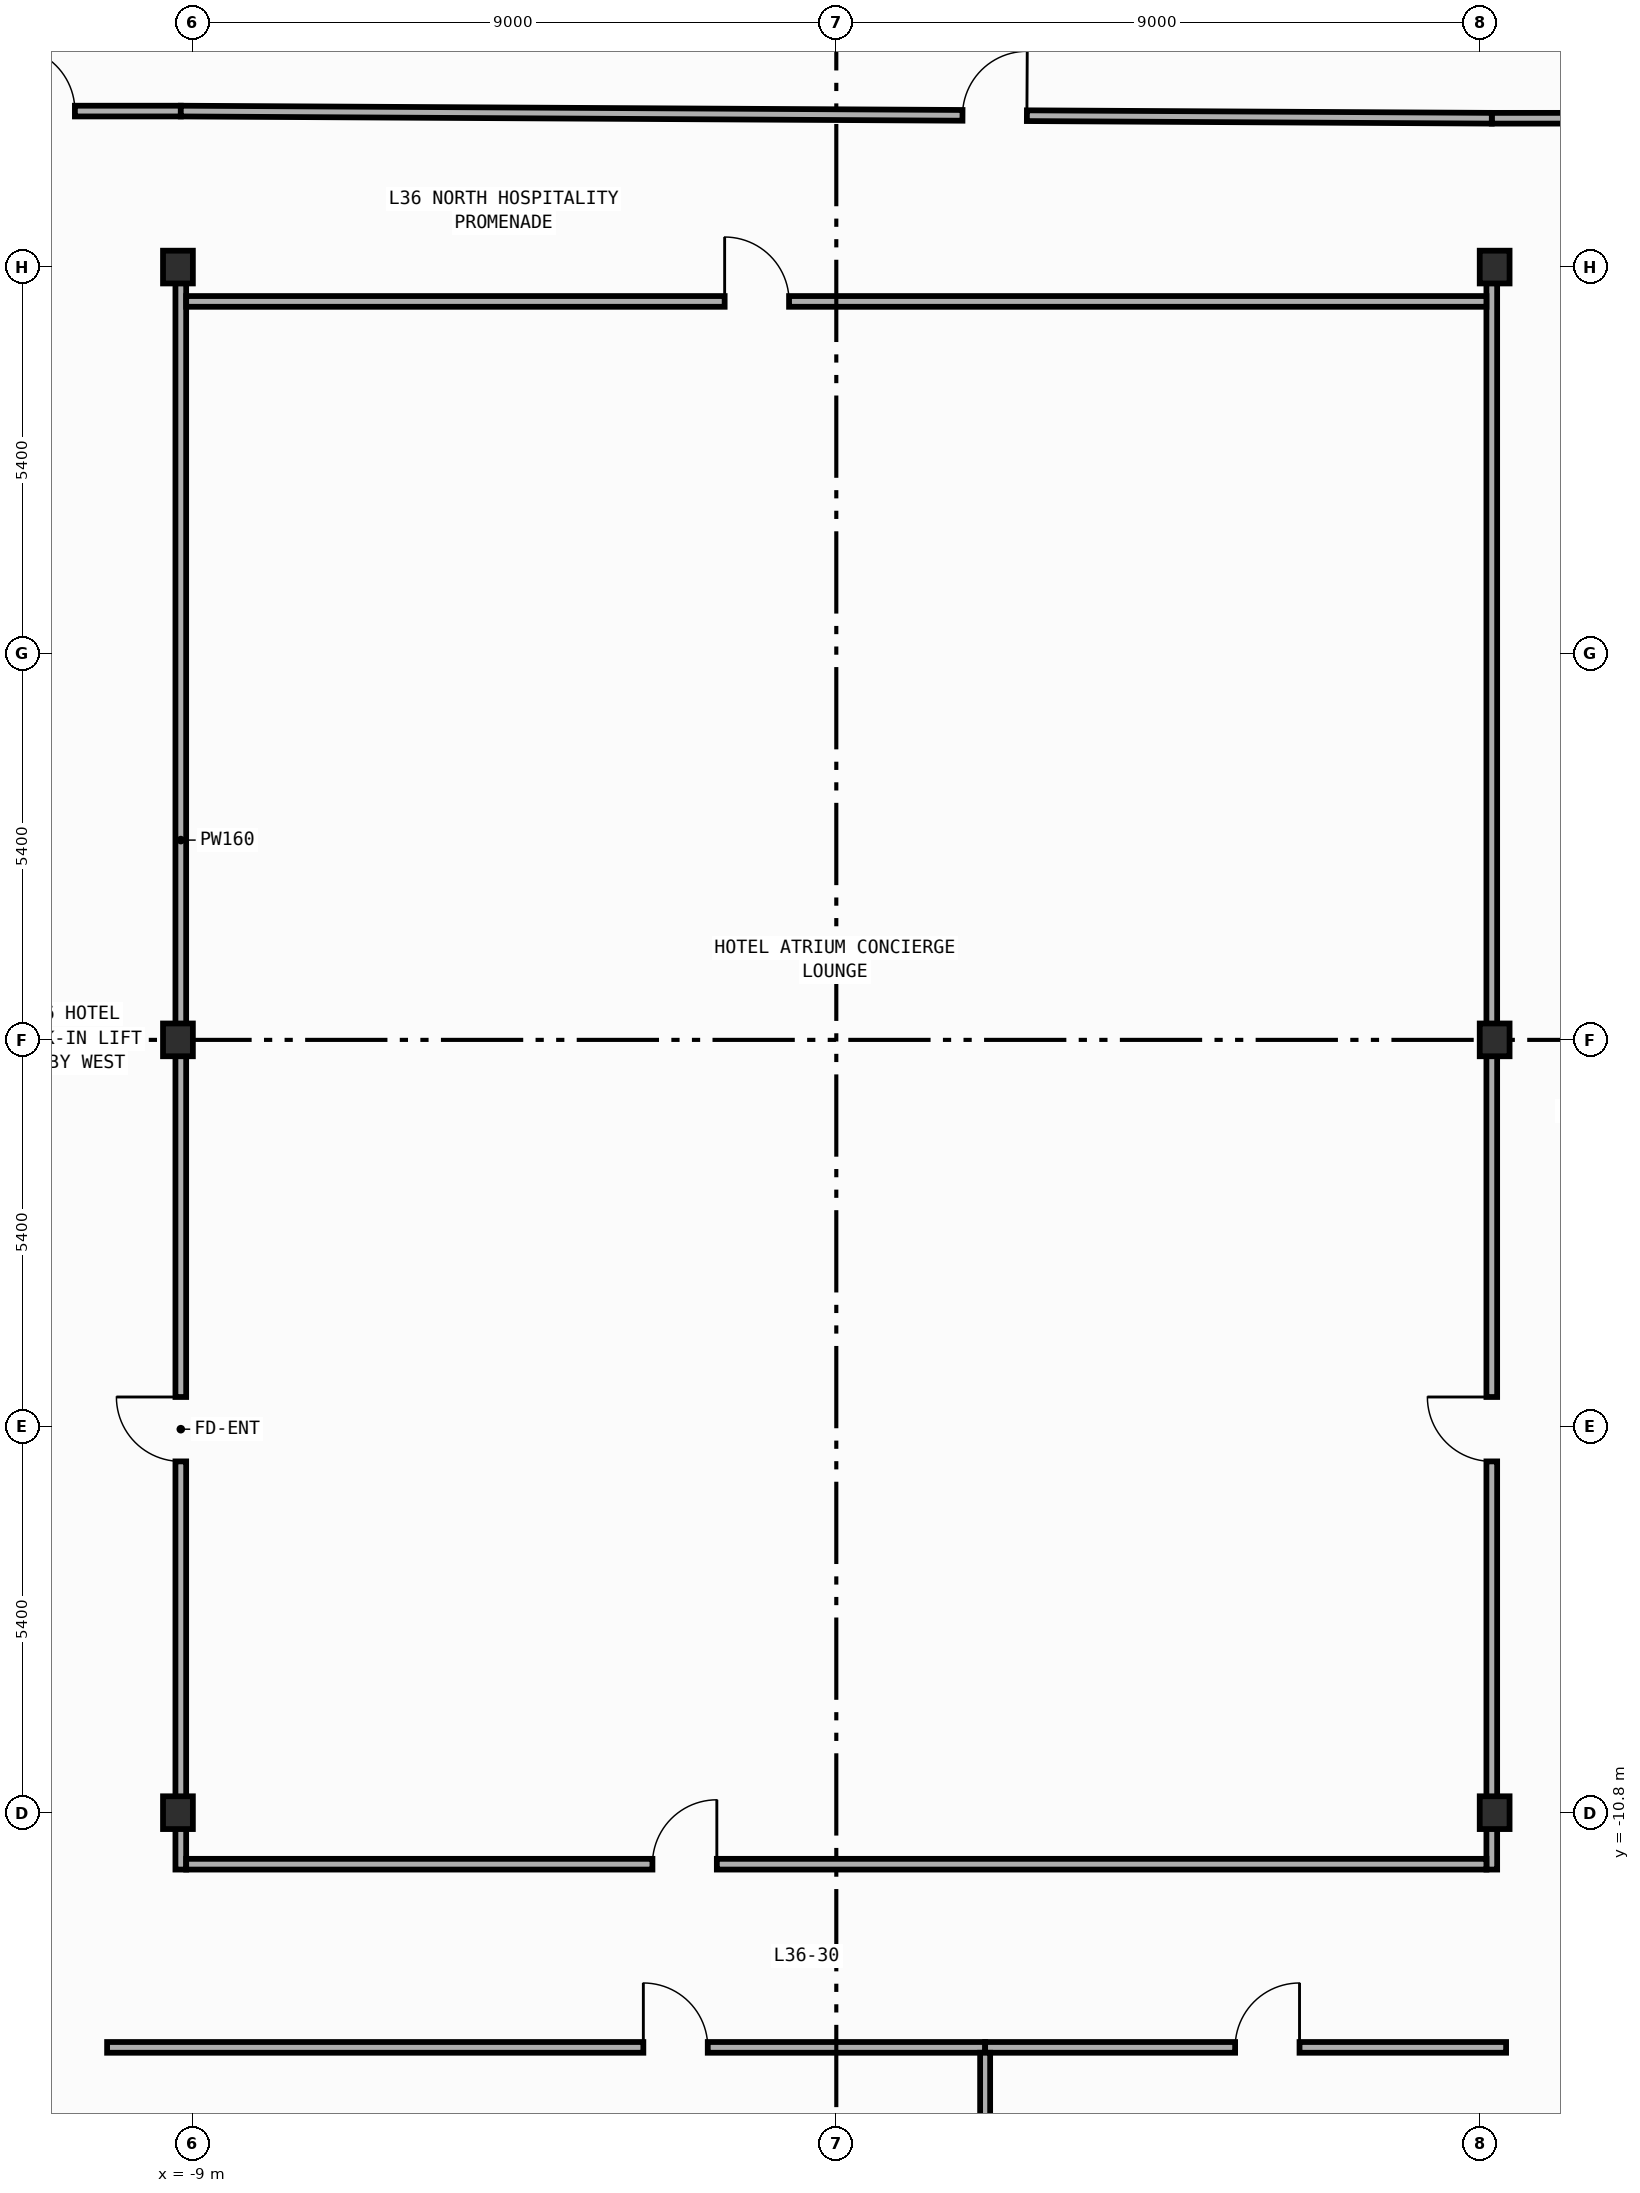
"""IFC4 building model, lengths in metres.
Left out: names, types, materials, properties, quantities, classifications, styles, units other than length and angle.
Written with IfcOpenShell. Run it as: python <this file> out.ifc"""

import sys

from ifc_helpers import new_model, si_unit, direction, frame, frame_2d, origin, origin_2d, place, context, subcontext, project, spatial, rectangle, i_section, extrude, element, fill, save


model = new_model("IFC4")
c1 = context("Model", 3, precision=1e-05, world=origin(), true_north=direction((0.0, 1.0)))
c2 = subcontext(c1, "Body", "Model", "MODEL_VIEW")
j1 = project(units=[si_unit("LENGTHUNIT", "METRE"), si_unit("PLANEANGLEUNIT", "RADIAN")], contexts=[c1])
p1 = place(None, origin())
s1 = spatial("IfcSite", under=j1, at=p1, CompositionType="ELEMENT")
p2 = place(p1, origin())
s2 = spatial("IfcBuilding", under=s1, at=p2, CompositionType="ELEMENT")
p3 = place(p2, frame((0.0, 0.0, 160.4)))
s3 = spatial("IfcBuildingStorey", under=s2, at=p3, CompositionType="ELEMENT", Elevation=160.4)
for number, where, z_axis, x_axis in (
    (1, (-9.2, -10.8, 0.0), (0.0, 0.0, 1.0), (1.0, 0.0, 0.0)),
    (2, (-9.2, 0.0, 0.0), (0.0, 0.0, 1.0), (1.0, 0.0, 0.0)),
    (3, (-9.2, 10.8, 0.0), (0.0, 0.0, 1.0), (1.0, 0.0, 0.0)),
    (4, (9.2, -10.8, 0.0), (0.0, 0.0, 1.0), (1.0, 0.0, 0.0)),
    (5, (9.2, 0.0, 0.0), (0.0, 0.0, 1.0), (1.0, 0.0, 0.0)),
    (6, (9.2, 10.8, 0.0), (0.0, 0.0, 1.0), (1.0, 0.0, 0.0)),
):
    element("IfcColumn", number, at=place(p3, frame(where, z_axis=z_axis, x_axis=x_axis)), inside=s3, PredefinedType="COLUMN", context=c2, shape_type="SweptSolid", body=[
        extrude(i_section(OverallWidth=0.417, OverallDepth=0.458, WebThickness=0.03, FlangeThickness=0.05, FilletRadius=0.022, at=origin_2d()), origin(), (0.0, 0.0, 1.0), 4.6),
    ])
p4 = place(p3, frame((-9.16, -11.595, 0.0), z_axis=(0.0, 0.0, 1.0), x_axis=(0.0, 1.0, 0.0)))
e7 = element("IfcWall", 7, at=p4, inside=s3, PredefinedType="PARTITIONING", context=c2, shape_type="SweptSolid", body=[
    extrude(rectangle(XDim=22.17, YDim=0.15, at=frame_2d((11.085, 0.0))), origin(), (0.0, 0.0, 1.0), 3.752),
])
p5 = place(p4, frame((5.704, 0.0, 0.0)))
e8 = element("IfcOpeningElement", 8, at=p5, cuts=e7, PredefinedType="OPENING", context=c2, shape_type="SweptSolid", body=[
    extrude(rectangle(XDim=0.9, YDim=2.15, at=frame_2d((0.45, 1.075))), frame((0.0, 0.085, 0.0), z_axis=(0.0, -1.0, 0.0), x_axis=(1.0, 0.0, 0.0)), (0.0, 0.0, 1.0), 0.17),
])
p6 = place(p3, frame((-12.0, 12.98, 0.0), z_axis=(0.0, 0.0, 1.0), x_axis=(1.0, 0.0, 0.0)))
e9 = element("IfcWall", 9, at=p6, inside=s3, PredefinedType="PARTITIONING", context=c2, shape_type="SweptSolid", body=[
    extrude(rectangle(XDim=2.84, YDim=0.15, at=frame_2d((1.42, 0.0))), origin(), (0.0, 0.0, 1.0), 4.34),
])
p7 = place(p6, frame((0.46, 0.0, 0.0)))
e10 = element("IfcOpeningElement", 10, at=p7, cuts=e9, PredefinedType="OPENING", context=c2, shape_type="SweptSolid", body=[
    extrude(rectangle(XDim=0.9, YDim=2.15, at=frame_2d((0.45, 1.075))), frame((0.0, 0.085, 0.0), z_axis=(0.0, -1.0, 0.0), x_axis=(1.0, 0.0, 0.0)), (0.0, 0.0, 1.0), 0.17),
])
p8 = place(p3, frame((9.16, -11.595, 0.0), z_axis=(0.0, 0.0, 1.0), x_axis=(0.0, 1.0, 0.0)))
e11 = element("IfcWall", 11, at=p8, inside=s3, PredefinedType="PARTITIONING", context=c2, shape_type="SweptSolid", body=[
    extrude(rectangle(XDim=22.17, YDim=0.15, at=frame_2d((11.085, 0.0))), origin(), (0.0, 0.0, 1.0), 3.752),
])
p9 = place(p8, frame((5.704, 0.0, 0.0)))
e12 = element("IfcOpeningElement", 12, at=p9, cuts=e11, PredefinedType="OPENING", context=c2, shape_type="SweptSolid", body=[
    extrude(rectangle(XDim=0.9, YDim=2.15, at=frame_2d((0.45, 1.075))), frame((0.0, 0.085, 0.0), z_axis=(0.0, -1.0, 0.0), x_axis=(1.0, 0.0, 0.0)), (0.0, 0.0, 1.0), 0.17),
])
p10 = place(p3, frame((9.16, 12.88, 0.0), z_axis=(0.0, 0.0, 1.0), x_axis=(1.0, 0.0, 0.0)))
e13 = element("IfcWall", 13, at=p10, inside=s3, PredefinedType="PARTITIONING", context=c2, shape_type="SweptSolid", body=[
    extrude(rectangle(XDim=2.98, YDim=0.15, at=frame_2d((1.49, 0.0))), origin(), (0.0, 0.0, 1.0), 4.34),
])
p11 = place(p10, frame((1.62, 0.0, 0.0)))
e14 = element("IfcOpeningElement", 14, at=p11, cuts=e13, PredefinedType="OPENING", context=c2, shape_type="SweptSolid", body=[
    extrude(rectangle(XDim=0.9, YDim=2.15, at=frame_2d((0.45, 1.075))), frame((0.0, 0.085, 0.0), z_axis=(0.0, -1.0, 0.0), x_axis=(1.0, 0.0, 0.0)), (0.0, 0.0, 1.0), 0.17),
])
p12 = place(p3, frame((-9.085, -11.52, 0.0), z_axis=(0.0, 0.0, 1.0), x_axis=(1.0, 0.0, 0.0)))
e15 = element("IfcWall", 15, at=p12, inside=s3, PredefinedType="PARTITIONING", context=c2, shape_type="SweptSolid", body=[
    extrude(rectangle(XDim=18.17, YDim=0.15, at=frame_2d((9.085, 0.0))), origin(), (0.0, 0.0, 1.0), 4.34),
])
p13 = place(p12, frame((6.516, 0.0, 0.0)))
e16 = element("IfcOpeningElement", 16, at=p13, cuts=e15, PredefinedType="OPENING", context=c2, shape_type="SweptSolid", body=[
    extrude(rectangle(XDim=0.9, YDim=2.15, at=frame_2d((0.45, 1.075))), frame((0.0, 0.085, 0.0), z_axis=(0.0, -1.0, 0.0), x_axis=(1.0, 0.0, 0.0)), (0.0, 0.0, 1.0), 0.17),
])
p14 = place(p3, frame((-10.19, -14.08, 0.0), z_axis=(0.0, 0.0, 1.0), x_axis=(1.0, 0.0, 0.0)))
e17 = element("IfcWall", 17, at=p14, inside=s3, PredefinedType="PARTITIONING", context=c2, shape_type="SweptSolid", body=[
    extrude(rectangle(XDim=12.27, YDim=0.15, at=frame_2d((6.135, 0.0))), origin(), (0.0, 0.0, 1.0), 4.34),
])
p15 = place(p14, frame((7.494, 0.0, 0.0)))
e18 = element("IfcOpeningElement", 18, at=p15, cuts=e17, PredefinedType="OPENING", context=c2, shape_type="SweptSolid", body=[
    extrude(rectangle(XDim=0.9, YDim=2.15, at=frame_2d((0.45, 1.075))), frame((0.0, 0.085, 0.0), z_axis=(0.0, -1.0, 0.0), x_axis=(1.0, 0.0, 0.0)), (0.0, 0.0, 1.0), 0.17),
])
p16 = place(p3, frame((2.08, -14.08, 0.0), z_axis=(0.0, 0.0, 1.0), x_axis=(1.0, 0.0, 0.0)))
e19 = element("IfcWall", 19, at=p16, inside=s3, PredefinedType="PARTITIONING", context=c2, shape_type="SweptSolid", body=[
    extrude(rectangle(XDim=7.28, YDim=0.15, at=frame_2d((3.64, 0.0))), origin(), (0.0, 0.0, 1.0), 4.34),
])
p17 = place(p16, frame((3.493, 0.0, 0.0)))
e20 = element("IfcOpeningElement", 20, at=p17, cuts=e19, PredefinedType="OPENING", context=c2, shape_type="SweptSolid", body=[
    extrude(rectangle(XDim=0.9, YDim=2.15, at=frame_2d((0.45, 1.075))), frame((0.0, 0.085, 0.0), z_axis=(0.0, -1.0, 0.0), x_axis=(1.0, 0.0, 0.0)), (0.0, 0.0, 1.0), 0.17),
])
p18 = place(p3, frame((-9.085, 10.32, 0.0), z_axis=(0.0, 0.0, 1.0), x_axis=(1.0, 0.0, 0.0)))
e21 = element("IfcWall", 21, at=p18, inside=s3, PredefinedType="PARTITIONING", context=c2, shape_type="SweptSolid", body=[
    extrude(rectangle(XDim=18.17, YDim=0.15, at=frame_2d((9.085, 0.0))), origin(), (0.0, 0.0, 1.0), 4.34),
])
p19 = place(p18, frame((7.525, 0.0, 0.0)))
e22 = element("IfcOpeningElement", 22, at=p19, cuts=e21, PredefinedType="OPENING", context=c2, shape_type="SweptSolid", body=[
    extrude(rectangle(XDim=0.9, YDim=2.15, at=frame_2d((0.45, 1.075))), frame((0.0, 0.085, 0.0), z_axis=(0.0, -1.0, 0.0), x_axis=(1.0, 0.0, 0.0)), (0.0, 0.0, 1.0), 0.17),
])
p20 = place(p3, frame((-9.16, 12.98, 0.0), z_axis=(0.0, 0.0, 1.0), x_axis=(0.999985073242, -0.005463816733, 0.0)))
e23 = element("IfcWall", 23, at=p20, inside=s3, PredefinedType="PARTITIONING", context=c2, shape_type="SweptSolid", body=[
    extrude(rectangle(XDim=18.32, YDim=0.15, at=frame_2d((9.16, 0.0))), origin(), (0.0, 0.0, 1.0), 4.34),
])
p21 = place(p20, frame((10.924, 0.0, 0.0)))
e24 = element("IfcOpeningElement", 24, at=p21, cuts=e23, PredefinedType="OPENING", context=c2, shape_type="SweptSolid", body=[
    extrude(rectangle(XDim=0.9, YDim=2.15, at=frame_2d((0.45, 1.075))), frame((0.0, 0.085, 0.0), z_axis=(0.0, -1.0, 0.0), x_axis=(1.0, 0.0, 0.0)), (0.0, 0.0, 1.0), 0.17),
])
p22 = place(p3, frame((2.08, -25.26, 0.0), z_axis=(0.0, 0.0, 1.0), x_axis=(0.0, 1.0, 0.0)))
e25 = element("IfcWall", 25, at=p22, inside=s3, PredefinedType="PARTITIONING", context=c2, shape_type="SweptSolid", body=[
    extrude(rectangle(XDim=11.104, YDim=0.14, at=frame_2d((5.552, 0.0))), origin(), (0.0, 0.0, 1.0), 4.34),
])
p23 = place(p5, origin())
e26 = element("IfcDoor", 26, at=p23, inside=s3, OperationType="SINGLE_SWING_RIGHT", PredefinedType="DOOR", context=c2, shape_type="SweptSolid", body=[
    extrude(rectangle(XDim=0.9, YDim=2.15, at=frame_2d((0.45, 1.075))), frame((0.0, 0.025, 0.0), z_axis=(0.0, -1.0, 0.0), x_axis=(1.0, 0.0, 0.0)), (0.0, 0.0, 1.0), 0.05),
])
fill(e8, e26)
p24 = place(p7, origin())
e27 = element("IfcDoor", 27, at=p24, inside=s3, OperationType="SINGLE_SWING_LEFT", PredefinedType="DOOR", context=c2, shape_type="SweptSolid", body=[
    extrude(rectangle(XDim=0.9, YDim=2.15, at=frame_2d((0.45, 1.075))), frame((0.0, 0.025, 0.0), z_axis=(0.0, -1.0, 0.0), x_axis=(1.0, 0.0, 0.0)), (0.0, 0.0, 1.0), 0.05),
])
fill(e10, e27)
p25 = place(p9, origin())
e28 = element("IfcDoor", 28, at=p25, inside=s3, OperationType="SINGLE_SWING_RIGHT", PredefinedType="DOOR", context=c2, shape_type="SweptSolid", body=[
    extrude(rectangle(XDim=0.9, YDim=2.15, at=frame_2d((0.45, 1.075))), frame((0.0, 0.025, 0.0), z_axis=(0.0, -1.0, 0.0), x_axis=(1.0, 0.0, 0.0)), (0.0, 0.0, 1.0), 0.05),
])
fill(e12, e28)
p26 = place(p13, origin())
e29 = element("IfcDoor", 29, at=p26, inside=s3, OperationType="SINGLE_SWING_RIGHT", PredefinedType="DOOR", context=c2, shape_type="SweptSolid", body=[
    extrude(rectangle(XDim=0.9, YDim=2.15, at=frame_2d((0.45, 1.075))), frame((0.0, 0.025, 0.0), z_axis=(0.0, -1.0, 0.0), x_axis=(1.0, 0.0, 0.0)), (0.0, 0.0, 1.0), 0.05),
])
fill(e16, e29)
p27 = place(p15, origin())
e30 = element("IfcDoor", 30, at=p27, inside=s3, OperationType="SINGLE_SWING_LEFT", PredefinedType="DOOR", context=c2, shape_type="SweptSolid", body=[
    extrude(rectangle(XDim=0.9, YDim=2.15, at=frame_2d((0.45, 1.075))), frame((0.0, 0.025, 0.0), z_axis=(0.0, -1.0, 0.0), x_axis=(1.0, 0.0, 0.0)), (0.0, 0.0, 1.0), 0.05),
])
fill(e18, e30)
p28 = place(p17, origin())
e31 = element("IfcDoor", 31, at=p28, inside=s3, OperationType="SINGLE_SWING_RIGHT", PredefinedType="DOOR", context=c2, shape_type="SweptSolid", body=[
    extrude(rectangle(XDim=0.9, YDim=2.15, at=frame_2d((0.45, 1.075))), frame((0.0, 0.025, 0.0), z_axis=(0.0, -1.0, 0.0), x_axis=(1.0, 0.0, 0.0)), (0.0, 0.0, 1.0), 0.05),
])
fill(e20, e31)
p29 = place(p19, origin())
e32 = element("IfcDoor", 32, at=p29, inside=s3, OperationType="SINGLE_SWING_LEFT", PredefinedType="DOOR", context=c2, shape_type="SweptSolid", body=[
    extrude(rectangle(XDim=0.9, YDim=2.15, at=frame_2d((0.45, 1.075))), frame((0.0, 0.025, 0.0), z_axis=(0.0, -1.0, 0.0), x_axis=(1.0, 0.0, 0.0)), (0.0, 0.0, 1.0), 0.05),
])
fill(e22, e32)
p30 = place(p21, origin())
e33 = element("IfcDoor", 33, at=p30, inside=s3, OperationType="SINGLE_SWING_RIGHT", PredefinedType="DOOR", context=c2, shape_type="SweptSolid", body=[
    extrude(rectangle(XDim=0.9, YDim=2.15, at=frame_2d((0.45, 1.075))), frame((0.0, 0.025, 0.0), z_axis=(0.0, -1.0, 0.0), x_axis=(1.0, 0.0, 0.0)), (0.0, 0.0, 1.0), 0.05),
])
fill(e24, e33)
save(model, sys.argv[1])
